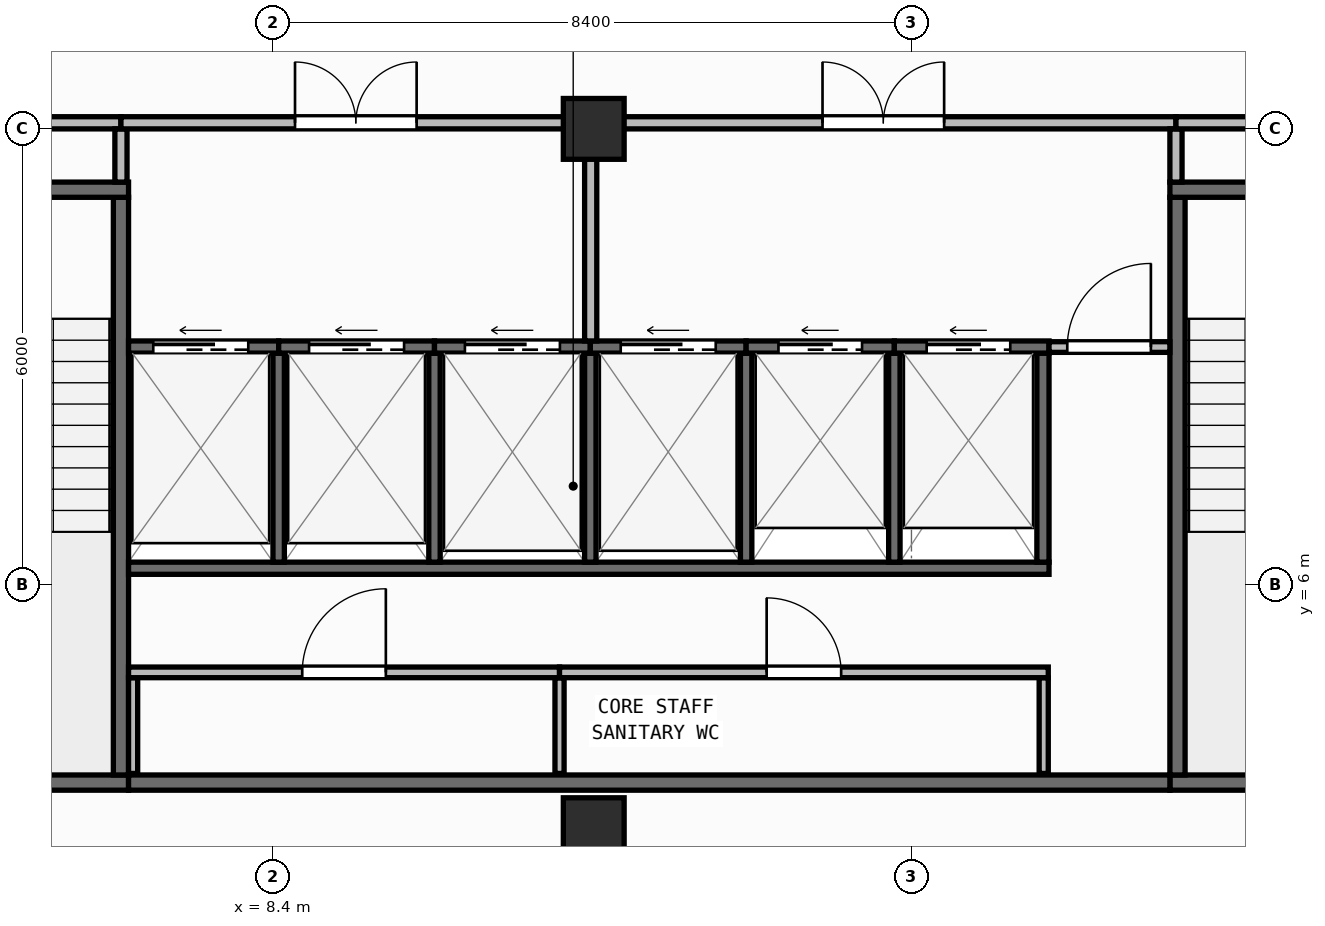
"""IFC4 building model, lengths in metres.
Left out: names, types, materials, properties, quantities, classifications, styles, units other than length and angle.
Written with IfcOpenShell. Run it as: python <this file> out.ifc"""

import sys

from ifc_helpers import new_model, si_unit, direction, frame, frame_2d, origin, origin_2d, place, context, subcontext, project, spatial, rectangle, extrude, element, fill, save


model = new_model("IFC4")
c1 = context("Model", 3, precision=1e-05, world=origin(), true_north=direction((0.0, 1.0)))
c2 = subcontext(c1, "Body", "Model", "MODEL_VIEW")
j1 = project(units=[si_unit("LENGTHUNIT", "METRE"), si_unit("PLANEANGLEUNIT", "RADIAN")], contexts=[c1])
p1 = place(None, origin())
s1 = spatial("IfcSite", under=j1, at=p1, CompositionType="ELEMENT")
p2 = place(p1, origin())
s2 = spatial("IfcBuilding", under=s1, at=p2, CompositionType="ELEMENT")
p3 = place(p2, frame((0.0, 0.0, 256.55)))
s3 = spatial("IfcBuildingStorey", under=s2, at=p3, CompositionType="ELEMENT", Elevation=256.55)
for number, where, z_axis, x_axis in (
    (1, (12.62, 2.8, 0.0), (0.0, 0.0, 1.0), (1.0, 0.0, 0.0)),
    (2, (12.62, 12.0, 0.0), (0.0, 0.0, 1.0), (1.0, 0.0, 0.0)),
):
    element("IfcColumn", number, at=place(p3, frame(where, z_axis=z_axis, x_axis=x_axis)), inside=s3, PredefinedType="COLUMN", context=c2, shape_type="SweptSolid", body=[
        extrude(rectangle(XDim=0.8, YDim=0.8, at=origin_2d()), origin(), (0.0, 0.0, 1.0), 3.95),
    ])
p4 = place(p3, frame((2.56, 0.173, 0.0), z_axis=(0.0, 0.0, 1.0), x_axis=(0.996798206282, 0.079958338856, 0.0)))
e3 = element("IfcWall", 3, at=p4, inside=s3, PredefinedType="STANDARD", context=c2, shape_type="SweptSolid", body=[
    extrude(rectangle(XDim=37.199, YDim=0.26, at=frame_2d((18.6, 0.0))), origin(), (0.0, 0.0, 1.0), 3.71),
])
p5 = place(p4, frame((17.4, 0.0, 0.9)))
e4 = element("IfcOpeningElement", 4, at=p5, cuts=e3, PredefinedType="OPENING", context=c2, shape_type="SweptSolid", body=[
    extrude(rectangle(XDim=2.4, YDim=1.65, at=frame_2d((1.2, 0.825))), frame((0.0, 0.14, 0.0), z_axis=(0.0, -1.0, 0.0), x_axis=(1.0, 0.0, 0.0)), (0.0, 0.0, 1.0), 0.28),
])
p6 = place(p3, frame((2.8, 3.4, 0.0), z_axis=(0.0, 0.0, 1.0), x_axis=(1.0, 0.0, 0.0)))
e5 = element("IfcWall", 5, at=p6, inside=s3, PredefinedType="SHEAR", context=c2, shape_type="SweptSolid", body=[
    extrude(rectangle(XDim=3.7, YDim=0.2, at=frame_2d((1.85, 0.0))), origin(), (0.0, 0.0, 1.0), 3.71),
])
p7 = place(p3, frame((6.4, 3.5, 0.0), z_axis=(0.0, 0.0, 1.0), x_axis=(0.0, 1.0, 0.0)))
e6 = element("IfcWall", 6, at=p7, inside=s3, PredefinedType="SHEAR", context=c2, shape_type="SweptSolid", body=[
    extrude(rectangle(XDim=7.6, YDim=0.2, at=frame_2d((3.8, 0.0))), origin(), (0.0, 0.0, 1.0), 3.71),
])
p8 = place(p3, frame((2.8, 11.2, 0.0), z_axis=(0.0, 0.0, 1.0), x_axis=(1.0, 0.0, 0.0)))
e7 = element("IfcWall", 7, at=p8, inside=s3, PredefinedType="SHEAR", context=c2, shape_type="SweptSolid", body=[
    extrude(rectangle(XDim=3.7, YDim=0.2, at=frame_2d((1.85, 0.0))), origin(), (0.0, 0.0, 1.0), 3.71),
])
p9 = place(p8, frame((1.2, 0.0, 0.0)))
e8 = element("IfcOpeningElement", 8, at=p9, cuts=e7, PredefinedType="OPENING", context=c2, shape_type="SweptSolid", body=[
    extrude(rectangle(XDim=1.3, YDim=2.15, at=frame_2d((0.65, 1.075))), frame((0.0, 0.11, 0.0), z_axis=(0.0, -1.0, 0.0), x_axis=(1.0, 0.0, 0.0)), (0.0, 0.0, 1.0), 0.22),
])
p10 = place(p3, frame((20.2, 3.4, 0.0), z_axis=(0.0, 0.0, 1.0), x_axis=(1.0, 0.0, 0.0)))
e9 = element("IfcWall", 9, at=p10, inside=s3, PredefinedType="SHEAR", context=c2, shape_type="SweptSolid", body=[
    extrude(rectangle(XDim=3.7, YDim=0.2, at=frame_2d((1.85, 0.0))), origin(), (0.0, 0.0, 1.0), 3.71),
])
p11 = place(p3, frame((20.3, 3.5, 0.0), z_axis=(0.0, 0.0, 1.0), x_axis=(0.0, 1.0, 0.0)))
e10 = element("IfcWall", 10, at=p11, inside=s3, PredefinedType="SHEAR", context=c2, shape_type="SweptSolid", body=[
    extrude(rectangle(XDim=7.6, YDim=0.2, at=frame_2d((3.8, 0.0))), origin(), (0.0, 0.0, 1.0), 3.71),
])
p12 = place(p3, frame((20.2, 11.2, 0.0), z_axis=(0.0, 0.0, 1.0), x_axis=(1.0, 0.0, 0.0)))
e11 = element("IfcWall", 11, at=p12, inside=s3, PredefinedType="SHEAR", context=c2, shape_type="SweptSolid", body=[
    extrude(rectangle(XDim=3.7, YDim=0.2, at=frame_2d((1.85, 0.0))), origin(), (0.0, 0.0, 1.0), 3.71),
])
p13 = place(p12, frame((1.2, 0.0, 0.0)))
e12 = element("IfcOpeningElement", 12, at=p13, cuts=e11, PredefinedType="OPENING", context=c2, shape_type="SweptSolid", body=[
    extrude(rectangle(XDim=1.3, YDim=2.15, at=frame_2d((0.65, 1.075))), frame((0.0, 0.11, 0.0), z_axis=(0.0, -1.0, 0.0), x_axis=(1.0, 0.0, 0.0)), (0.0, 0.0, 1.0), 0.22),
])
p14 = place(p3, frame((6.5, 3.4, 0.0), z_axis=(0.0, 0.0, 1.0), x_axis=(1.0, 0.0, 0.0)))
e13 = element("IfcWall", 13, at=p14, inside=s3, PredefinedType="SHEAR", context=c2, shape_type="SweptSolid", body=[
    extrude(rectangle(XDim=13.7, YDim=0.2, at=frame_2d((6.85, 0.0))), origin(), (0.0, 0.0, 1.0), 3.71),
])
p15 = place(p3, frame((6.5, 6.22, 0.0), z_axis=(0.0, 0.0, 1.0), x_axis=(1.0, 0.0, 0.0)))
e14 = element("IfcWall", 14, at=p15, inside=s3, PredefinedType="SHEAR", context=c2, shape_type="SweptSolid", body=[
    extrude(rectangle(XDim=12.11, YDim=0.16, at=frame_2d((6.055, 0.0))), origin(), (0.0, 0.0, 1.0), 3.71),
])
p16 = place(p3, frame((18.53, 6.3, 0.0), z_axis=(0.0, 0.0, 1.0), x_axis=(0.0, 1.0, 0.0)))
e15 = element("IfcWall", 15, at=p16, inside=s3, PredefinedType="SHEAR", context=c2, shape_type="SweptSolid", body=[
    extrude(rectangle(XDim=2.75, YDim=0.16, at=frame_2d((1.375, 0.0))), origin(), (0.0, 0.0, 1.0), 3.71),
])
for number, where, z_axis, x_axis in (
    (16, (8.475, 6.3, 0.0), (0.0, 0.0, 1.0), (0.0, 1.0, 0.0)),
    (17, (10.525, 6.3, 0.0), (0.0, 0.0, 1.0), (0.0, 1.0, 0.0)),
    (18, (12.575, 6.3, 0.0), (0.0, 0.0, 1.0), (0.0, 1.0, 0.0)),
    (19, (14.625, 6.3, 0.0), (0.0, 0.0, 1.0), (0.0, 1.0, 0.0)),
    (20, (16.575, 6.3, 0.0), (0.0, 0.0, 1.0), (0.0, 1.0, 0.0)),
):
    element("IfcWall", number, at=place(p3, frame(where, z_axis=z_axis, x_axis=x_axis)), inside=s3, PredefinedType="SHEAR", context=c2, shape_type="SweptSolid", body=[
        extrude(rectangle(XDim=2.75, YDim=0.15, at=frame_2d((1.375, 0.0))), origin(), (0.0, 0.0, 1.0), 3.71),
    ])
p17 = place(p3, frame((6.5, 9.13, 0.0), z_axis=(0.0, 0.0, 1.0), x_axis=(1.0, 0.0, 0.0)))
e21 = element("IfcWall", 21, at=p17, inside=s3, PredefinedType="SHEAR", context=c2, shape_type="SweptSolid", body=[
    extrude(rectangle(XDim=1.975, YDim=0.16, at=frame_2d((0.988, 0.0))), origin(), (0.0, 0.0, 1.0), 3.71),
])
p18 = place(p17, frame((0.325, 0.0, 0.0)))
e22 = element("IfcOpeningElement", 22, at=p18, cuts=e21, PredefinedType="OPENING", context=c2, shape_type="SweptSolid", body=[
    extrude(rectangle(XDim=1.25, YDim=2.15, at=frame_2d((0.625, 1.075))), frame((0.0, 0.09, 0.0), z_axis=(0.0, -1.0, 0.0), x_axis=(1.0, 0.0, 0.0)), (0.0, 0.0, 1.0), 0.18),
])
p19 = place(p3, frame((8.475, 9.13, 0.0), z_axis=(0.0, 0.0, 1.0), x_axis=(1.0, 0.0, 0.0)))
e23 = element("IfcWall", 23, at=p19, inside=s3, PredefinedType="SHEAR", context=c2, shape_type="SweptSolid", body=[
    extrude(rectangle(XDim=2.05, YDim=0.16, at=frame_2d((1.025, 0.0))), origin(), (0.0, 0.0, 1.0), 3.71),
])
p20 = place(p19, frame((0.4, 0.0, 0.0)))
e24 = element("IfcOpeningElement", 24, at=p20, cuts=e23, PredefinedType="OPENING", context=c2, shape_type="SweptSolid", body=[
    extrude(rectangle(XDim=1.25, YDim=2.15, at=frame_2d((0.625, 1.075))), frame((0.0, 0.09, 0.0), z_axis=(0.0, -1.0, 0.0), x_axis=(1.0, 0.0, 0.0)), (0.0, 0.0, 1.0), 0.18),
])
p21 = place(p3, frame((10.525, 9.13, 0.0), z_axis=(0.0, 0.0, 1.0), x_axis=(1.0, 0.0, 0.0)))
e25 = element("IfcWall", 25, at=p21, inside=s3, PredefinedType="SHEAR", context=c2, shape_type="SweptSolid", body=[
    extrude(rectangle(XDim=2.05, YDim=0.16, at=frame_2d((1.025, 0.0))), origin(), (0.0, 0.0, 1.0), 3.71),
])
p22 = place(p21, frame((0.4, 0.0, 0.0)))
e26 = element("IfcOpeningElement", 26, at=p22, cuts=e25, PredefinedType="OPENING", context=c2, shape_type="SweptSolid", body=[
    extrude(rectangle(XDim=1.25, YDim=2.15, at=frame_2d((0.625, 1.075))), frame((0.0, 0.09, 0.0), z_axis=(0.0, -1.0, 0.0), x_axis=(1.0, 0.0, 0.0)), (0.0, 0.0, 1.0), 0.18),
])
p23 = place(p3, frame((12.575, 9.13, 0.0), z_axis=(0.0, 0.0, 1.0), x_axis=(1.0, 0.0, 0.0)))
e27 = element("IfcWall", 27, at=p23, inside=s3, PredefinedType="SHEAR", context=c2, shape_type="SweptSolid", body=[
    extrude(rectangle(XDim=2.05, YDim=0.16, at=frame_2d((1.025, 0.0))), origin(), (0.0, 0.0, 1.0), 3.71),
])
p24 = place(p23, frame((0.4, 0.0, 0.0)))
e28 = element("IfcOpeningElement", 28, at=p24, cuts=e27, PredefinedType="OPENING", context=c2, shape_type="SweptSolid", body=[
    extrude(rectangle(XDim=1.25, YDim=2.15, at=frame_2d((0.625, 1.075))), frame((0.0, 0.09, 0.0), z_axis=(0.0, -1.0, 0.0), x_axis=(1.0, 0.0, 0.0)), (0.0, 0.0, 1.0), 0.18),
])
p25 = place(p3, frame((14.625, 9.13, 0.0), z_axis=(0.0, 0.0, 1.0), x_axis=(1.0, 0.0, 0.0)))
e29 = element("IfcWall", 29, at=p25, inside=s3, PredefinedType="SHEAR", context=c2, shape_type="SweptSolid", body=[
    extrude(rectangle(XDim=1.95, YDim=0.16, at=frame_2d((0.975, 0.0))), origin(), (0.0, 0.0, 1.0), 3.71),
])
p26 = place(p25, frame((0.425, 0.0, 0.0)))
e30 = element("IfcOpeningElement", 30, at=p26, cuts=e29, PredefinedType="OPENING", context=c2, shape_type="SweptSolid", body=[
    extrude(rectangle(XDim=1.1, YDim=2.15, at=frame_2d((0.55, 1.075))), frame((0.0, 0.09, 0.0), z_axis=(0.0, -1.0, 0.0), x_axis=(1.0, 0.0, 0.0)), (0.0, 0.0, 1.0), 0.18),
])
p27 = place(p3, frame((16.575, 9.13, 0.0), z_axis=(0.0, 0.0, 1.0), x_axis=(1.0, 0.0, 0.0)))
e31 = element("IfcWall", 31, at=p27, inside=s3, PredefinedType="SHEAR", context=c2, shape_type="SweptSolid", body=[
    extrude(rectangle(XDim=2.035, YDim=0.16, at=frame_2d((1.018, 0.0))), origin(), (0.0, 0.0, 1.0), 3.71),
])
p28 = place(p27, frame((0.425, 0.0, 0.0)))
e32 = element("IfcOpeningElement", 32, at=p28, cuts=e31, PredefinedType="OPENING", context=c2, shape_type="SweptSolid", body=[
    extrude(rectangle(XDim=1.1, YDim=2.15, at=frame_2d((0.55, 1.075))), frame((0.0, 0.09, 0.0), z_axis=(0.0, -1.0, 0.0), x_axis=(1.0, 0.0, 0.0)), (0.0, 0.0, 1.0), 0.18),
])
for number, where, z_axis, x_axis in (
    (33, (6.56, 3.52, 0.0), (0.0, 0.0, 1.0), (0.0, 1.0, 0.0)),
    (34, (12.17, 3.52, 0.0), (0.0, 0.0, 1.0), (0.0, 1.0, 0.0)),
    (35, (18.54, 3.52, 0.0), (0.0, 0.0, 1.0), (0.0, 1.0, 0.0)),
):
    element("IfcWall", number, at=place(p3, frame(where, z_axis=z_axis, x_axis=x_axis)), inside=s3, PredefinedType="PARTITIONING", context=c2, shape_type="SweptSolid", body=[
        extrude(rectangle(XDim=1.26, YDim=0.12, at=frame_2d((0.63, 0.0))), origin(), (0.0, 0.0, 1.0), 3.71),
    ])
p29 = place(p3, frame((6.5, 4.85, 0.0), z_axis=(0.0, 0.0, 1.0), x_axis=(1.0, 0.0, 0.0)))
e36 = element("IfcWall", 36, at=p29, inside=s3, PredefinedType="PARTITIONING", context=c2, shape_type="SweptSolid", body=[
    extrude(rectangle(XDim=5.67, YDim=0.14, at=frame_2d((2.835, 0.0))), origin(), (0.0, 0.0, 1.0), 3.71),
])
p30 = place(p29, frame((2.285, 0.0, 0.0)))
e37 = element("IfcOpeningElement", 37, at=p30, cuts=e36, PredefinedType="OPENING", context=c2, shape_type="SweptSolid", body=[
    extrude(rectangle(XDim=1.1, YDim=2.1, at=frame_2d((0.55, 1.05))), frame((0.0, 0.08, 0.0), z_axis=(0.0, -1.0, 0.0), x_axis=(1.0, 0.0, 0.0)), (0.0, 0.0, 1.0), 0.16),
])
p31 = place(p3, frame((12.17, 4.85, 0.0), z_axis=(0.0, 0.0, 1.0), x_axis=(1.0, 0.0, 0.0)))
e38 = element("IfcWall", 38, at=p31, inside=s3, PredefinedType="PARTITIONING", context=c2, shape_type="SweptSolid", body=[
    extrude(rectangle(XDim=6.43, YDim=0.14, at=frame_2d((3.215, 0.0))), origin(), (0.0, 0.0, 1.0), 3.71),
])
p32 = place(p31, frame((2.725, 0.0, 0.0)))
e39 = element("IfcOpeningElement", 39, at=p32, cuts=e38, PredefinedType="OPENING", context=c2, shape_type="SweptSolid", body=[
    extrude(rectangle(XDim=0.98, YDim=2.1, at=frame_2d((0.49, 1.05))), frame((0.0, 0.08, 0.0), z_axis=(0.0, -1.0, 0.0), x_axis=(1.0, 0.0, 0.0)), (0.0, 0.0, 1.0), 0.16),
])
p33 = place(p3, frame((18.61, 9.13, 0.0), z_axis=(0.0, 0.0, 1.0), x_axis=(1.0, 0.0, 0.0)))
e40 = element("IfcWall", 40, at=p33, inside=s3, PredefinedType="PARTITIONING", context=c2, shape_type="SweptSolid", body=[
    extrude(rectangle(XDim=1.59, YDim=0.14, at=frame_2d((0.795, 0.0))), origin(), (0.0, 0.0, 1.0), 3.71),
])
p34 = place(p33, frame((0.24, 0.0, 0.0)))
e41 = element("IfcOpeningElement", 41, at=p34, cuts=e40, PredefinedType="OPENING", context=c2, shape_type="SweptSolid", body=[
    extrude(rectangle(XDim=1.1, YDim=2.1, at=frame_2d((0.55, 1.05))), frame((0.0, 0.08, 0.0), z_axis=(0.0, -1.0, 0.0), x_axis=(1.0, 0.0, 0.0)), (0.0, 0.0, 1.0), 0.16),
])
p35 = place(p3, frame((2.8, 12.08, 0.0), z_axis=(0.0, 0.0, 1.0), x_axis=(1.0, 0.0, 0.0)))
e42 = element("IfcWall", 42, at=p35, inside=s3, PredefinedType="PARTITIONING", context=c2, shape_type="SweptSolid", body=[
    extrude(rectangle(XDim=3.6, YDim=0.16, at=frame_2d((1.8, 0.0))), origin(), (0.0, 0.0, 1.0), 3.157),
])
p36 = place(p35, frame((1.0, 0.0, 0.0)))
e43 = element("IfcOpeningElement", 43, at=p36, cuts=e42, PredefinedType="OPENING", context=c2, shape_type="SweptSolid", body=[
    extrude(rectangle(XDim=1.6, YDim=2.05, at=frame_2d((0.8, 1.025))), frame((0.0, 0.09, 0.0), z_axis=(0.0, -1.0, 0.0), x_axis=(1.0, 0.0, 0.0)), (0.0, 0.0, 1.0), 0.18),
])
p37 = place(p3, frame((6.4, 11.3, 0.0), z_axis=(0.0, 0.0, 1.0), x_axis=(0.0, 1.0, 0.0)))
e44 = element("IfcWall", 44, at=p37, inside=s3, PredefinedType="PARTITIONING", context=c2, shape_type="SweptSolid", body=[
    extrude(rectangle(XDim=0.7, YDim=0.16, at=frame_2d((0.35, 0.0))), origin(), (0.0, 0.0, 1.0), 3.71),
])
p38 = place(p3, frame((6.4, 12.08, 0.0), z_axis=(0.0, 0.0, 1.0), x_axis=(1.0, 0.0, 0.0)))
e45 = element("IfcWall", 45, at=p38, inside=s3, PredefinedType="PARTITIONING", context=c2, shape_type="SweptSolid", body=[
    extrude(rectangle(XDim=6.18, YDim=0.16, at=frame_2d((3.09, 0.0))), origin(), (0.0, 0.0, 1.0), 3.157),
])
p39 = place(p38, frame((2.29, 0.0, 0.0)))
e46 = element("IfcOpeningElement", 46, at=p39, cuts=e45, PredefinedType="OPENING", context=c2, shape_type="SweptSolid", body=[
    extrude(rectangle(XDim=1.6, YDim=2.05, at=frame_2d((0.8, 1.025))), frame((0.0, 0.09, 0.0), z_axis=(0.0, -1.0, 0.0), x_axis=(1.0, 0.0, 0.0)), (0.0, 0.0, 1.0), 0.18),
])
p40 = place(p3, frame((12.58, 9.21, 0.0), z_axis=(0.0, 0.0, 1.0), x_axis=(0.0, 1.0, 0.0)))
e47 = element("IfcWall", 47, at=p40, inside=s3, PredefinedType="PARTITIONING", context=c2, shape_type="SweptSolid", body=[
    extrude(rectangle(XDim=2.79, YDim=0.16, at=frame_2d((1.395, 0.0))), origin(), (0.0, 0.0, 1.0), 3.71),
])
p41 = place(p3, frame((12.58, 12.08, 0.0), z_axis=(0.0, 0.0, 1.0), x_axis=(1.0, 0.0, 0.0)))
e48 = element("IfcWall", 48, at=p41, inside=s3, PredefinedType="PARTITIONING", context=c2, shape_type="SweptSolid", body=[
    extrude(rectangle(XDim=7.7, YDim=0.16, at=frame_2d((3.85, 0.0))), origin(), (0.0, 0.0, 1.0), 3.157),
])
p42 = place(p41, frame((3.05, 0.0, 0.0)))
e49 = element("IfcOpeningElement", 49, at=p42, cuts=e48, PredefinedType="OPENING", context=c2, shape_type="SweptSolid", body=[
    extrude(rectangle(XDim=1.6, YDim=2.05, at=frame_2d((0.8, 1.025))), frame((0.0, 0.09, 0.0), z_axis=(0.0, -1.0, 0.0), x_axis=(1.0, 0.0, 0.0)), (0.0, 0.0, 1.0), 0.18),
])
p43 = place(p3, frame((20.28, 11.3, 0.0), z_axis=(0.0, 0.0, 1.0), x_axis=(0.0, 1.0, 0.0)))
e50 = element("IfcWall", 50, at=p43, inside=s3, PredefinedType="PARTITIONING", context=c2, shape_type="SweptSolid", body=[
    extrude(rectangle(XDim=0.7, YDim=0.16, at=frame_2d((0.35, 0.0))), origin(), (0.0, 0.0, 1.0), 3.71),
])
p44 = place(p3, frame((20.28, 12.08, 0.0), z_axis=(0.0, 0.0, 1.0), x_axis=(1.0, 0.0, 0.0)))
e51 = element("IfcWall", 51, at=p44, inside=s3, PredefinedType="PARTITIONING", context=c2, shape_type="SweptSolid", body=[
    extrude(rectangle(XDim=3.62, YDim=0.16, at=frame_2d((1.81, 0.0))), origin(), (0.0, 0.0, 1.0), 3.157),
])
p45 = place(p44, frame((1.01, 0.0, 0.0)))
e52 = element("IfcOpeningElement", 52, at=p45, cuts=e51, PredefinedType="OPENING", context=c2, shape_type="SweptSolid", body=[
    extrude(rectangle(XDim=1.6, YDim=2.05, at=frame_2d((0.8, 1.025))), frame((0.0, 0.09, 0.0), z_axis=(0.0, -1.0, 0.0), x_axis=(1.0, 0.0, 0.0)), (0.0, 0.0, 1.0), 0.18),
])
p46 = place(p18, origin())
e53 = element("IfcDoor", 53, at=p46, inside=s3, OperationType="SLIDING_TO_LEFT", PredefinedType="DOOR", context=c2, shape_type="SweptSolid", body=[
    extrude(rectangle(XDim=1.25, YDim=2.15, at=frame_2d((0.625, 1.075))), frame((0.0, 0.025, 0.0), z_axis=(0.0, -1.0, 0.0), x_axis=(1.0, 0.0, 0.0)), (0.0, 0.0, 1.0), 0.05),
])
fill(e22, e53)
p47 = place(p20, origin())
e54 = element("IfcDoor", 54, at=p47, inside=s3, OperationType="SLIDING_TO_LEFT", PredefinedType="DOOR", context=c2, shape_type="SweptSolid", body=[
    extrude(rectangle(XDim=1.25, YDim=2.15, at=frame_2d((0.625, 1.075))), frame((0.0, 0.025, 0.0), z_axis=(0.0, -1.0, 0.0), x_axis=(1.0, 0.0, 0.0)), (0.0, 0.0, 1.0), 0.05),
])
fill(e24, e54)
p48 = place(p22, origin())
e55 = element("IfcDoor", 55, at=p48, inside=s3, OperationType="SLIDING_TO_LEFT", PredefinedType="DOOR", context=c2, shape_type="SweptSolid", body=[
    extrude(rectangle(XDim=1.25, YDim=2.15, at=frame_2d((0.625, 1.075))), frame((0.0, 0.025, 0.0), z_axis=(0.0, -1.0, 0.0), x_axis=(1.0, 0.0, 0.0)), (0.0, 0.0, 1.0), 0.05),
])
fill(e26, e55)
p49 = place(p24, origin())
e56 = element("IfcDoor", 56, at=p49, inside=s3, OperationType="SLIDING_TO_LEFT", PredefinedType="DOOR", context=c2, shape_type="SweptSolid", body=[
    extrude(rectangle(XDim=1.25, YDim=2.15, at=frame_2d((0.625, 1.075))), frame((0.0, 0.025, 0.0), z_axis=(0.0, -1.0, 0.0), x_axis=(1.0, 0.0, 0.0)), (0.0, 0.0, 1.0), 0.05),
])
fill(e28, e56)
p50 = place(p26, origin())
e57 = element("IfcDoor", 57, at=p50, inside=s3, OperationType="SLIDING_TO_LEFT", PredefinedType="DOOR", context=c2, shape_type="SweptSolid", body=[
    extrude(rectangle(XDim=1.1, YDim=2.15, at=frame_2d((0.55, 1.075))), frame((0.0, 0.025, 0.0), z_axis=(0.0, -1.0, 0.0), x_axis=(1.0, 0.0, 0.0)), (0.0, 0.0, 1.0), 0.05),
])
fill(e30, e57)
p51 = place(p28, origin())
e58 = element("IfcDoor", 58, at=p51, inside=s3, OperationType="SLIDING_TO_LEFT", PredefinedType="DOOR", context=c2, shape_type="SweptSolid", body=[
    extrude(rectangle(XDim=1.1, YDim=2.15, at=frame_2d((0.55, 1.075))), frame((0.0, 0.025, 0.0), z_axis=(0.0, -1.0, 0.0), x_axis=(1.0, 0.0, 0.0)), (0.0, 0.0, 1.0), 0.05),
])
fill(e32, e58)
p52 = place(p30, origin())
e59 = element("IfcDoor", 59, at=p52, inside=s3, OperationType="SINGLE_SWING_RIGHT", PredefinedType="DOOR", context=c2, shape_type="SweptSolid", body=[
    extrude(rectangle(XDim=1.1, YDim=2.1, at=frame_2d((0.55, 1.05))), frame((0.0, 0.025, 0.0), z_axis=(0.0, -1.0, 0.0), x_axis=(1.0, 0.0, 0.0)), (0.0, 0.0, 1.0), 0.05),
])
fill(e37, e59)
p53 = place(p32, origin())
e60 = element("IfcDoor", 60, at=p53, inside=s3, OperationType="SINGLE_SWING_LEFT", PredefinedType="DOOR", context=c2, shape_type="SweptSolid", body=[
    extrude(rectangle(XDim=0.98, YDim=2.1, at=frame_2d((0.49, 1.05))), frame((0.0, 0.025, 0.0), z_axis=(0.0, -1.0, 0.0), x_axis=(1.0, 0.0, 0.0)), (0.0, 0.0, 1.0), 0.05),
])
fill(e39, e60)
p54 = place(p34, origin())
e61 = element("IfcDoor", 61, at=p54, inside=s3, OperationType="SINGLE_SWING_RIGHT", PredefinedType="DOOR", context=c2, shape_type="SweptSolid", body=[
    extrude(rectangle(XDim=1.1, YDim=2.1, at=frame_2d((0.55, 1.05))), frame((0.0, 0.025, 0.0), z_axis=(0.0, -1.0, 0.0), x_axis=(1.0, 0.0, 0.0)), (0.0, 0.0, 1.0), 0.05),
])
fill(e41, e61)
p55 = place(p39, origin())
e62 = element("IfcDoor", 62, at=p55, inside=s3, OperationType="DOUBLE_DOOR_SINGLE_SWING", PredefinedType="DOOR", context=c2, shape_type="SweptSolid", body=[
    extrude(rectangle(XDim=1.6, YDim=2.05, at=frame_2d((0.8, 1.025))), frame((0.0, 0.025, 0.0), z_axis=(0.0, -1.0, 0.0), x_axis=(1.0, 0.0, 0.0)), (0.0, 0.0, 1.0), 0.05),
])
fill(e46, e62)
p56 = place(p42, origin())
e63 = element("IfcDoor", 63, at=p56, inside=s3, OperationType="DOUBLE_DOOR_SINGLE_SWING", PredefinedType="DOOR", context=c2, shape_type="SweptSolid", body=[
    extrude(rectangle(XDim=1.6, YDim=2.05, at=frame_2d((0.8, 1.025))), frame((0.0, 0.025, 0.0), z_axis=(0.0, -1.0, 0.0), x_axis=(1.0, 0.0, 0.0)), (0.0, 0.0, 1.0), 0.05),
])
fill(e49, e63)
save(model, sys.argv[1])
